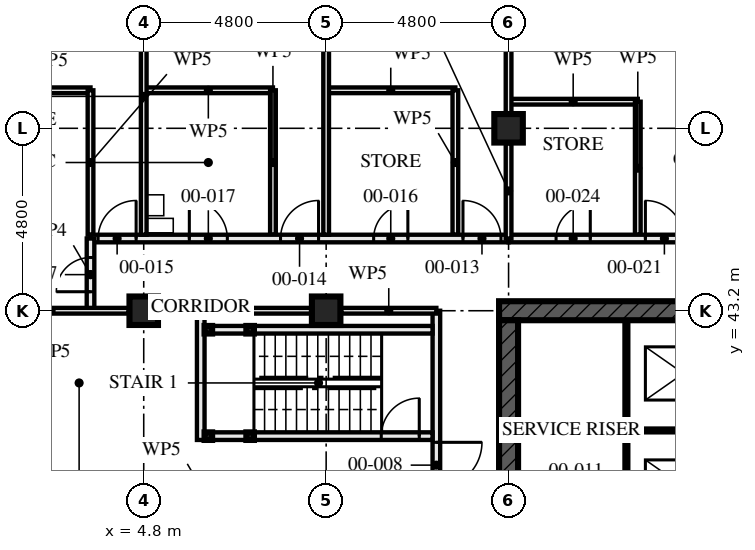
"""IFC4 building model, lengths in metres.
Left out: names, types, materials, properties, quantities, classifications, styles, units other than length and angle.
Written with IfcOpenShell. Run it as: python <this file> out.ifc"""

import sys

from ifc_helpers import new_model, si_unit, direction, frame, frame_2d, origin, origin_2d, place, context, subcontext, project, spatial, rectangle, hollow_rectangle, extrude, element, fill, save


model = new_model("IFC4")
c1 = context("Model", 3, precision=1e-05, world=origin(), true_north=direction((0.0, 1.0)))
c2 = subcontext(c1, "Body", "Model", "MODEL_VIEW")
j1 = project(units=[si_unit("LENGTHUNIT", "METRE"), si_unit("PLANEANGLEUNIT", "RADIAN")], contexts=[c1])
p1 = place(None, origin())
s1 = spatial("IfcSite", under=j1, at=p1, CompositionType="ELEMENT")
p2 = place(p1, origin())
s2 = spatial("IfcBuilding", under=s1, at=p2, CompositionType="ELEMENT")
p3 = place(p2, origin())
s3 = spatial("IfcBuildingStorey", under=s2, at=p3, CompositionType="ELEMENT", Elevation=0.0)
for number, where, z_axis, x_axis in (
    (1, (4.8, 43.2, 0.0), (0.0, 0.0, 1.0), (0.0, 1.0, 0.0)),
    (2, (9.6, 43.2, 0.0), (0.0, 0.0, 1.0), (0.0, 1.0, 0.0)),
    (3, (14.4, 48.0, 0.0), (0.0, 0.0, 1.0), (1.0, 0.0, 0.0)),
):
    element("IfcColumn", number, at=place(p3, frame(where, z_axis=z_axis, x_axis=x_axis)), inside=s3, PredefinedType="COLUMN", context=c2, shape_type="SweptSolid", body=[
        extrude(hollow_rectangle(XDim=0.75, YDim=0.75, WallThickness=0.08, at=origin_2d()), origin(), (0.0, 0.0, 1.0), 4.5),
    ])
p4 = place(p3, frame((29.05, 43.2, -1.8), z_axis=(0.0, 0.0, 1.0), x_axis=(-1.0, 0.0, 0.0)))
e4 = element("IfcWall", 4, at=p4, inside=s3, PredefinedType="SHEAR", context=c2, shape_type="SweptSolid", body=[
    extrude(rectangle(XDim=14.9, YDim=0.5, at=frame_2d((7.45, 0.0))), origin(), (0.0, 0.0, 1.0), 6.13),
])
p5 = place(p4, frame((6.85, 0.0, 1.8)))
e5 = element("IfcOpeningElement", 5, at=p5, cuts=e4, PredefinedType="OPENING", context=c2, shape_type="SweptSolid", body=[
    extrude(rectangle(XDim=1.2, YDim=2.1, at=frame_2d((0.6, 1.05))), frame((0.0, 0.26, 0.0), z_axis=(0.0, -1.0, 0.0), x_axis=(1.0, 0.0, 0.0)), (0.0, 0.0, 1.0), 0.521),
])
p6 = place(p3, frame((14.4, 42.95, -1.8), z_axis=(0.0, 0.0, 1.0), x_axis=(0.0, -1.0, 0.0)))
e6 = element("IfcWall", 6, at=p6, inside=s3, PredefinedType="SHEAR", context=c2, shape_type="SweptSolid", body=[
    extrude(rectangle(XDim=13.9, YDim=0.5, at=frame_2d((6.95, 0.0))), origin(), (0.0, 0.0, 1.0), 6.13),
])
p7 = place(p6, frame((6.35, 0.0, 1.8)))
e7 = element("IfcOpeningElement", 7, at=p7, cuts=e6, PredefinedType="OPENING", context=c2, shape_type="SweptSolid", body=[
    extrude(rectangle(XDim=1.2, YDim=2.1, at=frame_2d((0.6, 1.05))), frame((0.0, 0.26, 0.0), z_axis=(0.0, -1.0, 0.0), x_axis=(1.0, 0.0, 0.0)), (0.0, 0.0, 1.0), 0.521),
])
for number, where, z_axis, x_axis in (
    (8, (6.5, 42.7, 0.0), (0.0, 0.0, 1.0), (1.0, 0.0, 0.0)),
    (9, (6.5, 39.9, 0.0), (0.0, 0.0, 1.0), (1.0, 0.0, 0.0)),
    (10, (7.6, 42.7, 0.0), (0.0, 0.0, 1.0), (1.0, 0.0, 0.0)),
    (11, (7.6, 39.9, 0.0), (0.0, 0.0, 1.0), (1.0, 0.0, 0.0)),
):
    element("IfcColumn", number, at=place(p3, frame(where, z_axis=z_axis, x_axis=x_axis)), inside=s3, PredefinedType="COLUMN", context=c2, shape_type="SweptSolid", body=[
        extrude(hollow_rectangle(XDim=0.2, YDim=0.2, WallThickness=0.008, at=origin_2d()), origin(), (0.0, 0.0, 1.0), 4.33),
    ])
p8 = place(p3, frame((6.6, 42.7, 0.0), z_axis=(0.0, 0.0, 1.0), x_axis=(1.0, 0.0, 0.0)))
e12 = element("IfcWall", 12, at=p8, inside=s3, PredefinedType="SOLIDWALL", context=c2, shape_type="SweptSolid", body=[
    extrude(rectangle(XDim=0.9, YDim=0.2, at=frame_2d((0.45, 0.0))), origin(), (0.0, 0.0, 1.0), 3.99),
])
p9 = place(p3, frame((7.7, 42.7, 0.0), z_axis=(0.0, 0.0, 1.0), x_axis=(1.0, 0.0, 0.0)))
e13 = element("IfcWall", 13, at=p9, inside=s3, PredefinedType="SOLIDWALL", context=c2, shape_type="SweptSolid", body=[
    extrude(rectangle(XDim=4.7, YDim=0.2, at=frame_2d((2.35, 0.0))), origin(), (0.0, 0.0, 1.0), 3.99),
])
p10 = place(p3, frame((6.6, 39.9, 0.0), z_axis=(0.0, 0.0, 1.0), x_axis=(1.0, 0.0, 0.0)))
e14 = element("IfcWall", 14, at=p10, inside=s3, PredefinedType="SOLIDWALL", context=c2, shape_type="SweptSolid", body=[
    extrude(rectangle(XDim=0.9, YDim=0.2, at=frame_2d((0.45, 0.0))), origin(), (0.0, 0.0, 1.0), 3.99),
])
p11 = place(p3, frame((7.7, 39.9, 0.0), z_axis=(0.0, 0.0, 1.0), x_axis=(1.0, 0.0, 0.0)))
e15 = element("IfcWall", 15, at=p11, inside=s3, PredefinedType="SOLIDWALL", context=c2, shape_type="SweptSolid", body=[
    extrude(rectangle(XDim=4.7, YDim=0.2, at=frame_2d((2.35, 0.0))), origin(), (0.0, 0.0, 1.0), 3.99),
])
p12 = place(p11, frame((3.35, 0.0, 0.0)))
e16 = element("IfcOpeningElement", 16, at=p12, cuts=e15, PredefinedType="OPENING", context=c2, shape_type="SweptSolid", body=[
    extrude(rectangle(XDim=1.0, YDim=2.1, at=frame_2d((0.5, 1.05))), frame((0.0, 0.111, 0.0), z_axis=(0.0, -1.0, 0.0), x_axis=(1.0, 0.0, 0.0)), (0.0, 0.0, 1.0), 0.221),
])
p13 = place(p3, frame((6.3, 43.125, 0.0), z_axis=(0.0, 0.0, 1.0), x_axis=(0.0, -1.0, 0.0)))
e17 = element("IfcWall", 17, at=p13, inside=s3, PredefinedType="SOLIDWALL", context=c2, shape_type="SweptSolid", body=[
    extrude(rectangle(XDim=3.325, YDim=0.2, at=frame_2d((1.663, 0.0))), origin(), (0.0, 0.0, 1.0), 4.33),
])
p14 = place(p3, frame((12.5, 43.2, 0.0), z_axis=(0.0, 0.0, 1.0), x_axis=(0.0, -1.0, 0.0)))
e18 = element("IfcWall", 18, at=p14, inside=s3, PredefinedType="PARTITIONING", context=c2, shape_type="SweptSolid", body=[
    extrude(rectangle(XDim=14.4, YDim=0.2, at=frame_2d((7.2, 0.0))), origin(), (0.0, 0.0, 1.0), 3.55),
])
p15 = place(p14, frame((3.462, 0.0, 0.0)))
e19 = element("IfcOpeningElement", 19, at=p15, cuts=e18, PredefinedType="OPENING", context=c2, shape_type="SweptSolid", body=[
    extrude(rectangle(XDim=1.2, YDim=2.4, at=frame_2d((0.6, 1.2))), frame((0.0, 0.111, 0.0), z_axis=(0.0, -1.0, 0.0), x_axis=(1.0, 0.0, 0.0)), (0.0, 0.0, 1.0), 0.221),
])
p16 = place(p14, frame((5.0, 0.0, 0.0)))
e20 = element("IfcOpeningElement", 20, at=p16, cuts=e18, PredefinedType="OPENING", context=c2, shape_type="SweptSolid", body=[
    extrude(rectangle(XDim=1.0, YDim=2.4, at=frame_2d((0.5, 1.2))), frame((0.0, 0.111, 0.0), z_axis=(0.0, -1.0, 0.0), x_axis=(1.0, 0.0, 0.0)), (0.0, 0.0, 1.0), 0.221),
])
p17 = place(p14, frame((9.8, 0.0, 0.0)))
e21 = element("IfcOpeningElement", 21, at=p17, cuts=e18, PredefinedType="OPENING", context=c2, shape_type="SweptSolid", body=[
    extrude(rectangle(XDim=1.0, YDim=2.4, at=frame_2d((0.5, 1.2))), frame((0.0, 0.111, 0.0), z_axis=(0.0, -1.0, 0.0), x_axis=(1.0, 0.0, 0.0)), (0.0, 0.0, 1.0), 0.221),
])
p18 = place(p14, frame((7.45, 0.0, 0.0)))
e22 = element("IfcOpeningElement", 22, at=p18, cuts=e18, PredefinedType="OPENING", context=c2, shape_type="SweptSolid", body=[
    extrude(rectangle(XDim=0.9, YDim=2.1, at=frame_2d((0.45, 1.05))), frame((0.0, 0.111, 0.0), z_axis=(0.0, -1.0, 0.0), x_axis=(1.0, 0.0, 0.0)), (0.0, 0.0, 1.0), 0.221),
])
p19 = place(p14, frame((12.2, 0.0, 0.0)))
e23 = element("IfcOpeningElement", 23, at=p19, cuts=e18, PredefinedType="OPENING", context=c2, shape_type="SweptSolid", body=[
    extrude(rectangle(XDim=1.0, YDim=2.1, at=frame_2d((0.5, 1.05))), frame((0.0, 0.111, 0.0), z_axis=(0.0, -1.0, 0.0), x_axis=(1.0, 0.0, 0.0)), (0.0, 0.0, 1.0), 0.221),
])
p20 = place(p3, frame((13.0, 49.0, 0.0), z_axis=(0.0, 0.0, 1.0), x_axis=(0.0, -1.0, 0.0)))
e24 = element("IfcWall", 24, at=p20, inside=s3, PredefinedType="PARTITIONING", context=c2, shape_type="SweptSolid", body=[
    extrude(rectangle(XDim=3.8, YDim=0.15, at=frame_2d((1.9, 0.0))), origin(), (0.0, 0.0, 1.0), 3.55),
])
p21 = place(p3, frame((13.0, 49.0, 0.0), z_axis=(0.0, 0.0, 1.0), x_axis=(-1.0, 0.0, 0.0)))
e25 = element("IfcWall", 25, at=p21, inside=s3, PredefinedType="PARTITIONING", context=c2, shape_type="SweptSolid", body=[
    extrude(rectangle(XDim=3.4, YDim=0.15, at=frame_2d((1.7, 0.0))), origin(), (0.0, 0.0, 1.0), 4.33),
])
p22 = place(p3, frame((8.2, 49.0, 0.0), z_axis=(0.0, 0.0, 1.0), x_axis=(0.0, -1.0, 0.0)))
e26 = element("IfcWall", 26, at=p22, inside=s3, PredefinedType="PARTITIONING", context=c2, shape_type="SweptSolid", body=[
    extrude(rectangle(XDim=3.8, YDim=0.15, at=frame_2d((1.9, 0.0))), origin(), (0.0, 0.0, 1.0), 3.55),
])
p23 = place(p3, frame((8.2, 49.0, 0.0), z_axis=(0.0, 0.0, 1.0), x_axis=(-1.0, 0.0, 0.0)))
e27 = element("IfcWall", 27, at=p23, inside=s3, PredefinedType="PARTITIONING", context=c2, shape_type="SweptSolid", body=[
    extrude(rectangle(XDim=3.4, YDim=0.15, at=frame_2d((1.7, 0.0))), origin(), (0.0, 0.0, 1.0), 4.33),
])
p24 = place(p3, frame((3.4, 49.0, 0.0), z_axis=(0.0, 0.0, 1.0), x_axis=(0.0, -1.0, 0.0)))
e28 = element("IfcWall", 28, at=p24, inside=s3, PredefinedType="PARTITIONING", context=c2, shape_type="SweptSolid", body=[
    extrude(rectangle(XDim=3.8, YDim=0.15, at=frame_2d((1.9, 0.0))), origin(), (0.0, 0.0, 1.0), 3.55),
])
p25 = place(p3, frame((3.4, 49.0, 0.0), z_axis=(0.0, 0.0, 1.0), x_axis=(-1.0, 0.0, 0.0)))
e29 = element("IfcWall", 29, at=p25, inside=s3, PredefinedType="PARTITIONING", context=c2, shape_type="SweptSolid", body=[
    extrude(rectangle(XDim=3.75, YDim=0.15, at=frame_2d((1.875, 0.0))), origin(), (0.0, 0.0, 1.0), 3.32),
])
p26 = place(p3, frame((9.6, 57.28, 0.0), z_axis=(0.0, 0.0, 1.0), x_axis=(0.0, -1.0, 0.0)))
e30 = element("IfcWall", 30, at=p26, inside=s3, PredefinedType="PARTITIONING", context=c2, shape_type="SweptSolid", body=[
    extrude(rectangle(XDim=12.08, YDim=0.15, at=frame_2d((6.04, 0.0))), origin(), (0.0, 0.0, 1.0), 3.55),
])
p27 = place(p3, frame((4.8, 52.48, 0.0), z_axis=(0.0, 0.0, 1.0), x_axis=(0.0, -1.0, 0.0)))
e31 = element("IfcWall", 31, at=p27, inside=s3, PredefinedType="PARTITIONING", context=c2, shape_type="SweptSolid", body=[
    extrude(rectangle(XDim=7.28, YDim=0.15, at=frame_2d((3.64, 0.0))), origin(), (0.0, 0.0, 1.0), 3.55),
])
p28 = place(p3, frame((14.4, 45.1, 0.0), z_axis=(0.0, 0.0, 1.0), x_axis=(-1.0, 0.0, 0.0)))
e32 = element("IfcWall", 32, at=p28, inside=s3, PredefinedType="PARTITIONING", context=c2, shape_type="SweptSolid", body=[
    extrude(rectangle(XDim=11.0, YDim=0.2, at=frame_2d((5.5, 0.0))), origin(), (0.0, 0.0, 1.0), 4.33),
])
p29 = place(p28, frame((0.2, 0.0, 0.0)))
e33 = element("IfcOpeningElement", 33, at=p29, cuts=e32, PredefinedType="OPENING", context=c2, shape_type="SweptSolid", body=[
    extrude(rectangle(XDim=1.0, YDim=2.4, at=frame_2d((0.5, 1.2))), frame((0.0, 0.111, 0.0), z_axis=(0.0, -1.0, 0.0), x_axis=(1.0, 0.0, 0.0)), (0.0, 0.0, 1.0), 0.221),
])
p30 = place(p28, frame((5.0, 0.0, 0.0)))
e34 = element("IfcOpeningElement", 34, at=p30, cuts=e32, PredefinedType="OPENING", context=c2, shape_type="SweptSolid", body=[
    extrude(rectangle(XDim=1.0, YDim=2.4, at=frame_2d((0.5, 1.2))), frame((0.0, 0.111, 0.0), z_axis=(0.0, -1.0, 0.0), x_axis=(1.0, 0.0, 0.0)), (0.0, 0.0, 1.0), 0.221),
])
p31 = place(p28, frame((9.8, 0.0, 0.0)))
e35 = element("IfcOpeningElement", 35, at=p31, cuts=e32, PredefinedType="OPENING", context=c2, shape_type="SweptSolid", body=[
    extrude(rectangle(XDim=1.0, YDim=2.4, at=frame_2d((0.5, 1.2))), frame((0.0, 0.111, 0.0), z_axis=(0.0, -1.0, 0.0), x_axis=(1.0, 0.0, 0.0)), (0.0, 0.0, 1.0), 0.221),
])
p32 = place(p28, frame((2.65, 0.0, 0.0)))
e36 = element("IfcOpeningElement", 36, at=p32, cuts=e32, PredefinedType="OPENING", context=c2, shape_type="SweptSolid", body=[
    extrude(rectangle(XDim=0.9, YDim=2.1, at=frame_2d((0.45, 1.05))), frame((0.0, 0.111, 0.0), z_axis=(0.0, -1.0, 0.0), x_axis=(1.0, 0.0, 0.0)), (0.0, 0.0, 1.0), 0.221),
])
p33 = place(p28, frame((7.4, 0.0, 0.0)))
e37 = element("IfcOpeningElement", 37, at=p33, cuts=e32, PredefinedType="OPENING", context=c2, shape_type="SweptSolid", body=[
    extrude(rectangle(XDim=1.0, YDim=2.1, at=frame_2d((0.5, 1.05))), frame((0.0, 0.111, 0.0), z_axis=(0.0, -1.0, 0.0), x_axis=(1.0, 0.0, 0.0)), (0.0, 0.0, 1.0), 0.221),
])
p34 = place(p3, frame((17.8, 48.7, 0.0), z_axis=(0.0, 0.0, 1.0), x_axis=(0.0, -1.0, 0.0)))
e38 = element("IfcWall", 38, at=p34, inside=s3, PredefinedType="PARTITIONING", context=c2, shape_type="SweptSolid", body=[
    extrude(rectangle(XDim=3.5, YDim=0.15, at=frame_2d((1.75, 0.0))), origin(), (0.0, 0.0, 1.0), 3.55),
])
p35 = place(p3, frame((17.8, 48.7, 0.0), z_axis=(0.0, 0.0, 1.0), x_axis=(-1.0, 0.0, 0.0)))
e39 = element("IfcWall", 39, at=p35, inside=s3, PredefinedType="PARTITIONING", context=c2, shape_type="SweptSolid", body=[
    extrude(rectangle(XDim=3.4, YDim=0.15, at=frame_2d((1.7, 0.0))), origin(), (0.0, 0.0, 1.0), 4.33),
])
p36 = place(p3, frame((28.8, 45.1, 0.0), z_axis=(0.0, 0.0, 1.0), x_axis=(-1.0, 0.0, 0.0)))
e40 = element("IfcWall", 40, at=p36, inside=s3, PredefinedType="PARTITIONING", context=c2, shape_type="SweptSolid", body=[
    extrude(rectangle(XDim=14.4, YDim=0.2, at=frame_2d((7.2, 0.0))), origin(), (0.0, 0.0, 1.0), 4.33),
])
p37 = place(p36, frame((0.2, 0.0, 0.0)))
e41 = element("IfcOpeningElement", 41, at=p37, cuts=e40, PredefinedType="OPENING", context=c2, shape_type="SweptSolid", body=[
    extrude(rectangle(XDim=1.0, YDim=2.4, at=frame_2d((0.5, 1.2))), frame((0.0, 0.111, 0.0), z_axis=(0.0, -1.0, 0.0), x_axis=(1.0, 0.0, 0.0)), (0.0, 0.0, 1.0), 0.221),
])
p38 = place(p36, frame((5.0, 0.0, 0.0)))
e42 = element("IfcOpeningElement", 42, at=p38, cuts=e40, PredefinedType="OPENING", context=c2, shape_type="SweptSolid", body=[
    extrude(rectangle(XDim=1.0, YDim=2.4, at=frame_2d((0.5, 1.2))), frame((0.0, 0.111, 0.0), z_axis=(0.0, -1.0, 0.0), x_axis=(1.0, 0.0, 0.0)), (0.0, 0.0, 1.0), 0.221),
])
p39 = place(p36, frame((9.8, 0.0, 0.0)))
e43 = element("IfcOpeningElement", 43, at=p39, cuts=e40, PredefinedType="OPENING", context=c2, shape_type="SweptSolid", body=[
    extrude(rectangle(XDim=1.0, YDim=2.4, at=frame_2d((0.5, 1.2))), frame((0.0, 0.111, 0.0), z_axis=(0.0, -1.0, 0.0), x_axis=(1.0, 0.0, 0.0)), (0.0, 0.0, 1.0), 0.221),
])
p40 = place(p36, frame((2.65, 0.0, 0.0)))
e44 = element("IfcOpeningElement", 44, at=p40, cuts=e40, PredefinedType="OPENING", context=c2, shape_type="SweptSolid", body=[
    extrude(rectangle(XDim=0.9, YDim=2.1, at=frame_2d((0.45, 1.05))), frame((0.0, 0.111, 0.0), z_axis=(0.0, -1.0, 0.0), x_axis=(1.0, 0.0, 0.0)), (0.0, 0.0, 1.0), 0.221),
])
p41 = place(p36, frame((7.45, 0.0, 0.0)))
e45 = element("IfcOpeningElement", 45, at=p41, cuts=e40, PredefinedType="OPENING", context=c2, shape_type="SweptSolid", body=[
    extrude(rectangle(XDim=0.9, YDim=2.1, at=frame_2d((0.45, 1.05))), frame((0.0, 0.111, 0.0), z_axis=(0.0, -1.0, 0.0), x_axis=(1.0, 0.0, 0.0)), (0.0, 0.0, 1.0), 0.221),
])
p42 = place(p36, frame((12.25, 0.0, 0.0)))
e46 = element("IfcOpeningElement", 46, at=p42, cuts=e40, PredefinedType="OPENING", context=c2, shape_type="SweptSolid", body=[
    extrude(rectangle(XDim=0.9, YDim=2.1, at=frame_2d((0.45, 1.05))), frame((0.0, 0.111, 0.0), z_axis=(0.0, -1.0, 0.0), x_axis=(1.0, 0.0, 0.0)), (0.0, 0.0, 1.0), 0.221),
])
p43 = place(p3, frame((17.5, 37.15, -1.8), z_axis=(0.0, 0.0, 1.0), x_axis=(0.0, 1.0, 0.0)))
e47 = element("IfcWall", 47, at=p43, inside=s3, PredefinedType="SOLIDWALL", context=c2, shape_type="SweptSolid", body=[
    extrude(rectangle(XDim=5.8, YDim=0.1, at=frame_2d((2.9, 0.0))), origin(), (0.0, 0.0, 1.0), 6.13),
])
p44 = place(p3, frame((17.55, 40.05, -1.8), z_axis=(0.0, 0.0, 1.0), x_axis=(1.0, 0.0, 0.0)))
e48 = element("IfcWall", 48, at=p44, inside=s3, PredefinedType="SOLIDWALL", context=c2, shape_type="SweptSolid", body=[
    extrude(rectangle(XDim=2.9, YDim=0.1, at=frame_2d((1.45, 0.0))), origin(), (0.0, 0.0, 1.0), 6.13),
])
p45 = place(p3, frame((12.5, 43.2, 0.0), z_axis=(0.0, 0.0, 1.0), x_axis=(-1.0, 0.0, 0.0)))
e49 = element("IfcWall", 49, at=p45, inside=s3, PredefinedType="PARTITIONING", context=c2, shape_type="SweptSolid", body=[
    extrude(rectangle(XDim=2.505, YDim=0.15, at=frame_2d((1.252, 0.0))), origin(), (0.0, 0.0, 1.0), 3.32),
])
p46 = place(p3, frame((9.205, 43.2, 0.0), z_axis=(0.0, 0.0, 1.0), x_axis=(-1.0, 0.0, 0.0)))
e50 = element("IfcWall", 50, at=p46, inside=s3, PredefinedType="PARTITIONING", context=c2, shape_type="SweptSolid", body=[
    extrude(rectangle(XDim=4.01, YDim=0.15, at=frame_2d((2.005, 0.0))), origin(), (0.0, 0.0, 1.0), 3.32),
])
p47 = place(p3, frame((4.405, 43.2, 0.0), z_axis=(0.0, 0.0, 1.0), x_axis=(-1.0, 0.0, 0.0)))
e51 = element("IfcWall", 51, at=p47, inside=s3, PredefinedType="PARTITIONING", context=c2, shape_type="SweptSolid", body=[
    extrude(rectangle(XDim=4.085, YDim=0.15, at=frame_2d((2.042, 0.0))), origin(), (0.0, 0.0, 1.0), 3.32),
])
p48 = place(p3, frame((14.4, 45.1, 0.0), z_axis=(0.0, 0.0, 1.0), x_axis=(0.0, 1.0, 0.0)))
e52 = element("IfcWall", 52, at=p48, inside=s3, PredefinedType="PARTITIONING", context=c2, shape_type="SweptSolid", body=[
    extrude(rectangle(XDim=2.505, YDim=0.15, at=frame_2d((1.252, 0.0))), origin(), (0.0, 0.0, 1.0), 3.32),
])
p49 = place(p3, frame((14.4, 48.395, 0.0), z_axis=(0.0, 0.0, 1.0), x_axis=(0.0, 1.0, 0.0)))
e53 = element("IfcWall", 53, at=p49, inside=s3, PredefinedType="PARTITIONING", context=c2, shape_type="SweptSolid", body=[
    extrude(rectangle(XDim=4.01, YDim=0.15, at=frame_2d((2.005, 0.0))), origin(), (0.0, 0.0, 1.0), 3.32),
])
p50 = place(p3, frame((3.4, 45.1, 0.0), z_axis=(0.0, 0.0, 1.0), x_axis=(0.0, -1.0, 0.0)))
e54 = element("IfcWall", 54, at=p50, inside=s3, PredefinedType="PARTITIONING", context=c2, shape_type="SweptSolid", body=[
    extrude(rectangle(XDim=1.9, YDim=0.2, at=frame_2d((0.95, 0.0))), origin(), (0.0, 0.0, 1.0), 4.33),
])
p51 = place(p50, frame((0.5, 0.0, 0.0)))
e55 = element("IfcOpeningElement", 55, at=p51, cuts=e54, PredefinedType="OPENING", context=c2, shape_type="SweptSolid", body=[
    extrude(rectangle(XDim=0.9, YDim=2.1, at=frame_2d((0.45, 1.05))), frame((0.0, 0.111, 0.0), z_axis=(0.0, -1.0, 0.0), x_axis=(1.0, 0.0, 0.0)), (0.0, 0.0, 1.0), 0.221),
])
p52 = place(p12, origin())
e56 = element("IfcDoor", 56, at=p52, inside=s3, OperationType="SINGLE_SWING_LEFT", PredefinedType="DOOR", context=c2, shape_type="SweptSolid", body=[
    extrude(rectangle(XDim=1.0, YDim=2.1, at=frame_2d((0.5, 1.05))), frame((0.0, 0.032, 0.0), z_axis=(0.0, -1.0, 0.0), x_axis=(1.0, 0.0, 0.0)), (0.0, 0.0, 1.0), 0.064),
])
fill(e16, e56)
p53 = place(p15, origin())
e57 = element("IfcDoor", 57, at=p53, inside=s3, OperationType="SINGLE_SWING_RIGHT", PredefinedType="DOOR", context=c2, shape_type="SweptSolid", body=[
    extrude(rectangle(XDim=1.2, YDim=2.4, at=frame_2d((0.6, 1.2))), frame((0.0, 0.027, 0.0), z_axis=(0.0, -1.0, 0.0), x_axis=(1.0, 0.0, 0.0)), (0.0, 0.0, 1.0), 0.054),
])
fill(e19, e57)
p54 = place(p29, frame((1.0, 0.0, 0.0), z_axis=(0.0, 0.0, 1.0), x_axis=(-1.0, 0.0, 0.0)))
e58 = element("IfcDoor", 58, at=p54, inside=s3, OperationType="SINGLE_SWING_RIGHT", PredefinedType="DOOR", context=c2, shape_type="SweptSolid", body=[
    extrude(rectangle(XDim=1.0, YDim=2.4, at=frame_2d((0.5, 1.2))), frame((0.0, 0.027, 0.0), z_axis=(0.0, -1.0, 0.0), x_axis=(1.0, 0.0, 0.0)), (0.0, 0.0, 1.0), 0.054),
])
fill(e33, e58)
p55 = place(p30, frame((1.0, 0.0, 0.0), z_axis=(0.0, 0.0, 1.0), x_axis=(-1.0, 0.0, 0.0)))
e59 = element("IfcDoor", 59, at=p55, inside=s3, OperationType="SINGLE_SWING_LEFT", PredefinedType="DOOR", context=c2, shape_type="SweptSolid", body=[
    extrude(rectangle(XDim=1.0, YDim=2.4, at=frame_2d((0.5, 1.2))), frame((0.0, 0.027, 0.0), z_axis=(0.0, -1.0, 0.0), x_axis=(1.0, 0.0, 0.0)), (0.0, 0.0, 1.0), 0.054),
])
fill(e34, e59)
p56 = place(p31, frame((1.0, 0.0, 0.0), z_axis=(0.0, 0.0, 1.0), x_axis=(-1.0, 0.0, 0.0)))
e60 = element("IfcDoor", 60, at=p56, inside=s3, OperationType="SINGLE_SWING_LEFT", PredefinedType="DOOR", context=c2, shape_type="SweptSolid", body=[
    extrude(rectangle(XDim=1.0, YDim=2.4, at=frame_2d((0.5, 1.2))), frame((0.0, 0.027, 0.0), z_axis=(0.0, -1.0, 0.0), x_axis=(1.0, 0.0, 0.0)), (0.0, 0.0, 1.0), 0.054),
])
fill(e35, e60)
p57 = place(p32, frame((0.9, 0.0, 0.0), z_axis=(0.0, 0.0, 1.0), x_axis=(-1.0, 0.0, 0.0)))
e61 = element("IfcDoor", 61, at=p57, inside=s3, OperationType="SINGLE_SWING_LEFT", PredefinedType="DOOR", context=c2, shape_type="SweptSolid", body=[
    extrude(rectangle(XDim=0.9, YDim=2.1, at=frame_2d((0.45, 1.05))), frame((0.0, 0.027, 0.0), z_axis=(0.0, -1.0, 0.0), x_axis=(1.0, 0.0, 0.0)), (0.0, 0.0, 1.0), 0.054),
])
fill(e36, e61)
p58 = place(p33, frame((1.0, 0.0, 0.0), z_axis=(0.0, 0.0, 1.0), x_axis=(-1.0, 0.0, 0.0)))
e62 = element("IfcDoor", 62, at=p58, inside=s3, OperationType="SINGLE_SWING_RIGHT", PredefinedType="DOOR", context=c2, shape_type="SweptSolid", body=[
    extrude(rectangle(XDim=1.0, YDim=2.1, at=frame_2d((0.5, 1.05))), frame((0.0, 0.027, 0.0), z_axis=(0.0, -1.0, 0.0), x_axis=(1.0, 0.0, 0.0)), (0.0, 0.0, 1.0), 0.054),
])
fill(e37, e62)
p59 = place(p39, frame((1.0, 0.0, 0.0), z_axis=(0.0, 0.0, 1.0), x_axis=(-1.0, 0.0, 0.0)))
e63 = element("IfcDoor", 63, at=p59, inside=s3, OperationType="SINGLE_SWING_RIGHT", PredefinedType="DOOR", context=c2, shape_type="SweptSolid", body=[
    extrude(rectangle(XDim=1.0, YDim=2.4, at=frame_2d((0.5, 1.2))), frame((0.0, 0.027, 0.0), z_axis=(0.0, -1.0, 0.0), x_axis=(1.0, 0.0, 0.0)), (0.0, 0.0, 1.0), 0.054),
])
fill(e43, e63)
p60 = place(p42, frame((0.9, 0.0, 0.0), z_axis=(0.0, 0.0, 1.0), x_axis=(-1.0, 0.0, 0.0)))
e64 = element("IfcDoor", 64, at=p60, inside=s3, OperationType="SINGLE_SWING_LEFT", PredefinedType="DOOR", context=c2, shape_type="SweptSolid", body=[
    extrude(rectangle(XDim=0.9, YDim=2.1, at=frame_2d((0.45, 1.05))), frame((0.0, 0.027, 0.0), z_axis=(0.0, -1.0, 0.0), x_axis=(1.0, 0.0, 0.0)), (0.0, 0.0, 1.0), 0.054),
])
fill(e46, e64)
p61 = place(p51, frame((0.9, 0.0, 0.0), z_axis=(0.0, 0.0, 1.0), x_axis=(-1.0, 0.0, 0.0)))
e65 = element("IfcDoor", 65, at=p61, inside=s3, OperationType="SINGLE_SWING_RIGHT", PredefinedType="DOOR", context=c2, shape_type="SweptSolid", body=[
    extrude(rectangle(XDim=0.9, YDim=2.1, at=frame_2d((0.45, 1.05))), frame((0.0, 0.027, 0.0), z_axis=(0.0, -1.0, 0.0), x_axis=(1.0, 0.0, 0.0)), (0.0, 0.0, 1.0), 0.054),
])
fill(e55, e65)
save(model, sys.argv[1])
